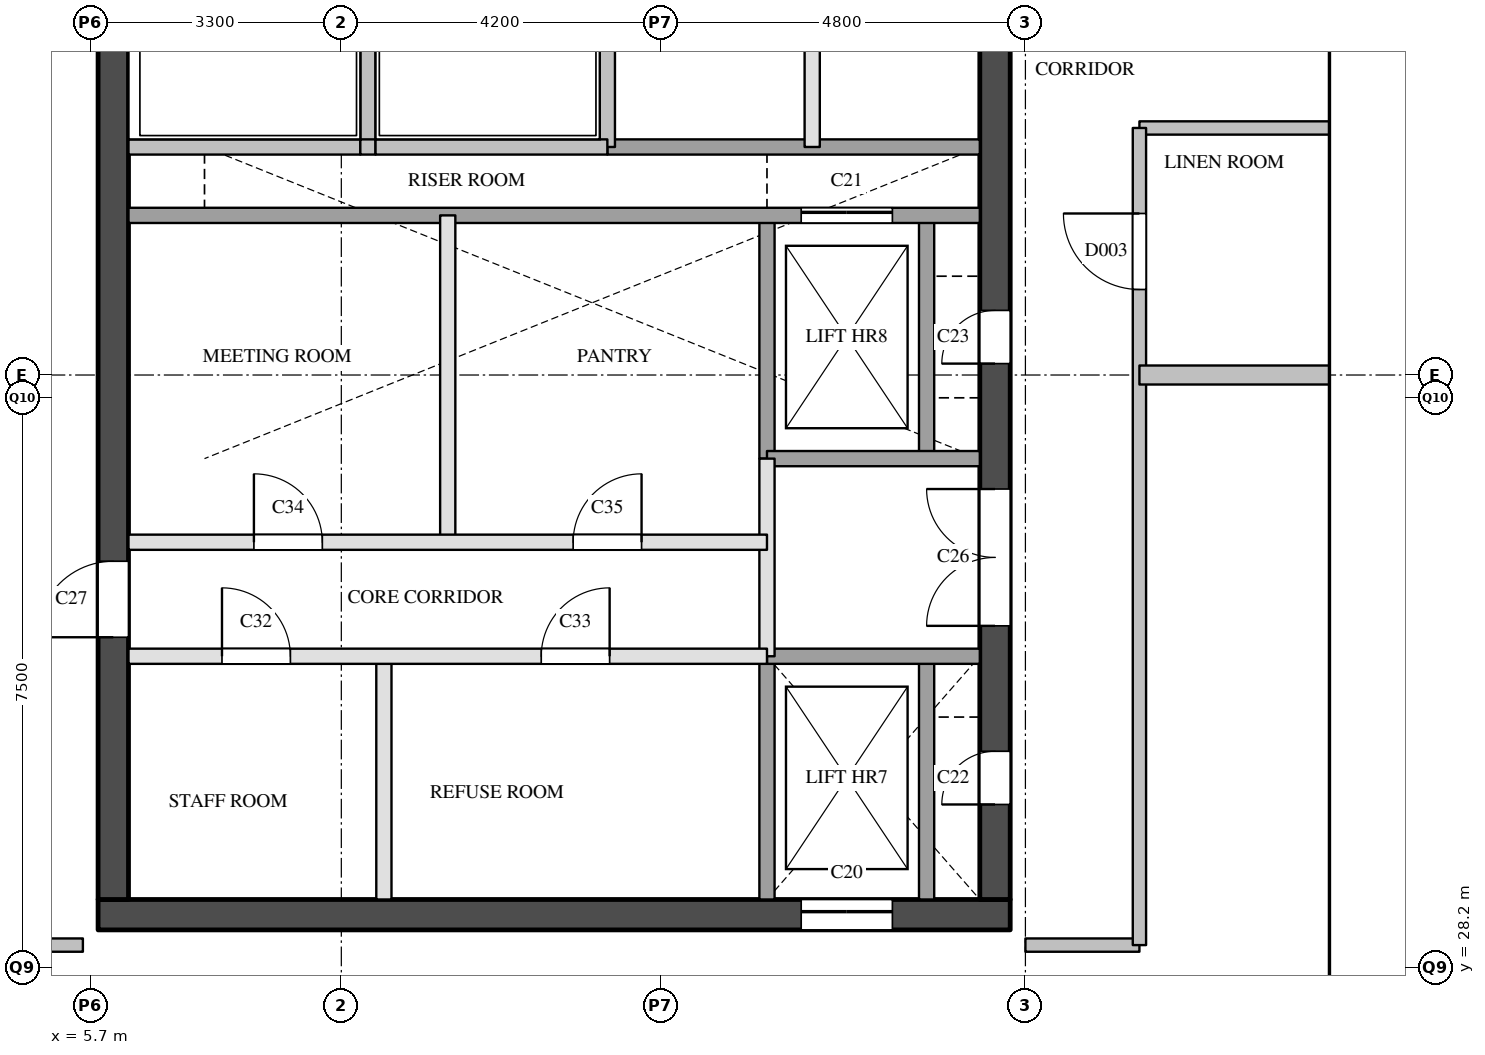
"""IFC4 building model, lengths in metres.
Left out: names, types, materials, properties, quantities, classifications, styles, units other than length and angle.
Written with IfcOpenShell. Run it as: python <this file> out.ifc"""

import sys

from ifc_helpers import new_model, si_unit, direction, frame, frame_2d, origin, place, context, subcontext, project, spatial, rectangle, extrude, element, fill, save


model = new_model("IFC4")
c1 = context("Model", 3, precision=1e-05, world=origin(), true_north=direction((0.0, 1.0)))
c2 = subcontext(c1, "Body", "Model", "MODEL_VIEW")
j1 = project(units=[si_unit("LENGTHUNIT", "METRE"), si_unit("PLANEANGLEUNIT", "RADIAN")], contexts=[c1])
p1 = place(None, origin())
s1 = spatial("IfcSite", under=j1, at=p1, CompositionType="ELEMENT")
p2 = place(p1, origin())
s2 = spatial("IfcBuilding", under=s1, at=p2, CompositionType="ELEMENT")
p3 = place(p2, frame((0.0, 0.0, 211.1)))
s3 = spatial("IfcBuildingStorey", under=s2, at=p3, CompositionType="ELEMENT", Elevation=211.1)
p4 = place(p3, frame((5.8, 28.9, 0.0), z_axis=(0.0, 0.0, 1.0), x_axis=(1.0, 0.0, 0.0)))
e1 = element("IfcWall", 1, at=p4, inside=s3, PredefinedType="SHEAR", context=c2, shape_type="SweptSolid", body=[
    extrude(rectangle(XDim=12.0, YDim=0.4, at=frame_2d((6.0, 0.0))), origin(), (0.0, 0.0, 1.0), 3.6),
])
p5 = place(p4, frame((9.25, 0.0, 0.0)))
e2 = element("IfcOpeningElement", 2, at=p5, cuts=e1, PredefinedType="OPENING", context=c2, shape_type="SweptSolid", body=[
    extrude(rectangle(XDim=1.2, YDim=2.1, at=frame_2d((0.6, 1.05))), frame((0.0, 0.21, 0.0), z_axis=(0.0, -1.0, 0.0), x_axis=(1.0, 0.0, 0.0)), (0.0, 0.0, 1.0), 0.42),
])
p6 = place(p3, frame((6.0, 29.1, 0.0), z_axis=(0.0, 0.0, 1.0), x_axis=(0.0, 1.0, 0.0)))
e3 = element("IfcWall", 3, at=p6, inside=s3, PredefinedType="SHEAR", context=c2, shape_type="SweptSolid", body=[
    extrude(rectangle(XDim=20.3, YDim=0.4, at=frame_2d((10.15, 0.0))), origin(), (0.0, 0.0, 1.0), 3.6),
])
p7 = place(p6, frame((3.45, 0.0, 0.0)))
e4 = element("IfcOpeningElement", 4, at=p7, cuts=e3, PredefinedType="OPENING", context=c2, shape_type="SweptSolid", body=[
    extrude(rectangle(XDim=1.0, YDim=2.1, at=frame_2d((0.5, 1.05))), frame((0.0, 0.21, 0.0), z_axis=(0.0, -1.0, 0.0), x_axis=(1.0, 0.0, 0.0)), (0.0, 0.0, 1.0), 0.42),
])
p8 = place(p6, frame((16.4, 0.0, 0.0)))
e5 = element("IfcOpeningElement", 5, at=p8, cuts=e3, PredefinedType="OPENING", context=c2, shape_type="SweptSolid", body=[
    extrude(rectangle(XDim=1.0, YDim=2.1, at=frame_2d((0.5, 1.05))), frame((0.0, 0.21, 0.0), z_axis=(0.0, -1.0, 0.0), x_axis=(1.0, 0.0, 0.0)), (0.0, 0.0, 1.0), 0.42),
])
p9 = place(p3, frame((17.6, 29.1, 0.0), z_axis=(0.0, 0.0, 1.0), x_axis=(0.0, 1.0, 0.0)))
e6 = element("IfcWall", 6, at=p9, inside=s3, PredefinedType="SHEAR", context=c2, shape_type="SweptSolid", body=[
    extrude(rectangle(XDim=20.3, YDim=0.4, at=frame_2d((10.15, 0.0))), origin(), (0.0, 0.0, 1.0), 3.6),
])
p10 = place(p9, frame((1.25, 0.0, 0.0)))
e7 = element("IfcOpeningElement", 7, at=p10, cuts=e6, PredefinedType="OPENING", context=c2, shape_type="SweptSolid", body=[
    extrude(rectangle(XDim=0.7, YDim=2.1, at=frame_2d((0.35, 1.05))), frame((0.0, 0.21, 0.0), z_axis=(0.0, -1.0, 0.0), x_axis=(1.0, 0.0, 0.0)), (0.0, 0.0, 1.0), 0.42),
])
p11 = place(p9, frame((7.05, 0.0, 0.0)))
e8 = element("IfcOpeningElement", 8, at=p11, cuts=e6, PredefinedType="OPENING", context=c2, shape_type="SweptSolid", body=[
    extrude(rectangle(XDim=0.7, YDim=2.1, at=frame_2d((0.35, 1.05))), frame((0.0, 0.21, 0.0), z_axis=(0.0, -1.0, 0.0), x_axis=(1.0, 0.0, 0.0)), (0.0, 0.0, 1.0), 0.42),
])
p12 = place(p9, frame((3.6, 0.0, 0.0)))
e9 = element("IfcOpeningElement", 9, at=p12, cuts=e6, PredefinedType="OPENING", context=c2, shape_type="SweptSolid", body=[
    extrude(rectangle(XDim=1.8, YDim=2.1, at=frame_2d((0.9, 1.05))), frame((0.0, 0.21, 0.0), z_axis=(0.0, -1.0, 0.0), x_axis=(1.0, 0.0, 0.0)), (0.0, 0.0, 1.0), 0.42),
])
p13 = place(p3, frame((9.35, 39.0, 0.0), z_axis=(0.0, 0.0, 1.0), x_axis=(0.0, 1.0, 0.0)))
e10 = element("IfcWall", 10, at=p13, inside=s3, PredefinedType="SOLIDWALL", context=c2, shape_type="SweptSolid", body=[
    extrude(rectangle(XDim=1.9, YDim=0.2, at=frame_2d((0.95, 0.0))), origin(), (0.0, 0.0, 1.0), 3.6),
])
p14 = place(p3, frame((9.56, 29.1, 0.0), z_axis=(0.0, 0.0, 1.0), x_axis=(0.0, 1.0, 0.0)))
e11 = element("IfcWall", 11, at=p14, inside=s3, PredefinedType="PARTITIONING", context=c2, shape_type="SweptSolid", body=[
    extrude(rectangle(XDim=3.2, YDim=0.2, at=frame_2d((1.6, 0.0))), origin(), (0.0, 0.0, 1.0), 3.6),
])
p15 = place(p3, frame((10.4, 33.8, 0.0), z_axis=(0.0, 0.0, 1.0), x_axis=(0.0, 1.0, 0.0)))
e12 = element("IfcWall", 12, at=p15, inside=s3, PredefinedType="PARTITIONING", context=c2, shape_type="SweptSolid", body=[
    extrude(rectangle(XDim=4.3, YDim=0.2, at=frame_2d((2.15, 0.0))), origin(), (0.0, 0.0, 1.0), 3.6),
])
p16 = place(p3, frame((12.5, 39.0, 0.0), z_axis=(0.0, 0.0, 1.0), x_axis=(0.0, 1.0, 0.0)))
e13 = element("IfcWall", 13, at=p16, inside=s3, PredefinedType="SOLIDWALL", context=c2, shape_type="SweptSolid", body=[
    extrude(rectangle(XDim=1.9, YDim=0.2, at=frame_2d((0.95, 0.0))), origin(), (0.0, 0.0, 1.0), 3.6),
])
p17 = place(p3, frame((14.6, 32.3, 0.0), z_axis=(0.0, 0.0, 1.0), x_axis=(0.0, 1.0, 0.0)))
e14 = element("IfcWall", 14, at=p17, inside=s3, PredefinedType="PARTITIONING", context=c2, shape_type="SweptSolid", body=[
    extrude(rectangle(XDim=2.6, YDim=0.2, at=frame_2d((1.3, 0.0))), origin(), (0.0, 0.0, 1.0), 3.6),
])
p18 = place(p3, frame((14.6, 29.1, 0.0), z_axis=(0.0, 0.0, 1.0), x_axis=(0.0, 1.0, 0.0)))
e15 = element("IfcWall", 15, at=p18, inside=s3, PredefinedType="SOLIDWALL", context=c2, shape_type="SweptSolid", body=[
    extrude(rectangle(XDim=3.2, YDim=0.2, at=frame_2d((1.6, 0.0))), origin(), (0.0, 0.0, 1.0), 3.6),
])
p19 = place(p3, frame((14.6, 34.9, 0.0), z_axis=(0.0, 0.0, 1.0), x_axis=(0.0, 1.0, 0.0)))
e16 = element("IfcWall", 16, at=p19, inside=s3, PredefinedType="SOLIDWALL", context=c2, shape_type="SweptSolid", body=[
    extrude(rectangle(XDim=3.2, YDim=0.2, at=frame_2d((1.6, 0.0))), origin(), (0.0, 0.0, 1.0), 3.6),
])
p20 = place(p3, frame((15.195, 39.0, 0.0), z_axis=(0.0, 0.0, 1.0), x_axis=(0.0, 1.0, 0.0)))
e17 = element("IfcWall", 17, at=p20, inside=s3, PredefinedType="PARTITIONING", context=c2, shape_type="SweptSolid", body=[
    extrude(rectangle(XDim=6.2, YDim=0.2, at=frame_2d((3.1, 0.0))), origin(), (0.0, 0.0, 1.0), 3.6),
])
p21 = place(p3, frame((16.7, 29.1, 0.0), z_axis=(0.0, 0.0, 1.0), x_axis=(0.0, 1.0, 0.0)))
e18 = element("IfcWall", 18, at=p21, inside=s3, PredefinedType="SOLIDWALL", context=c2, shape_type="SweptSolid", body=[
    extrude(rectangle(XDim=3.2, YDim=0.2, at=frame_2d((1.6, 0.0))), origin(), (0.0, 0.0, 1.0), 3.6),
])
p22 = place(p3, frame((16.7, 34.9, 0.0), z_axis=(0.0, 0.0, 1.0), x_axis=(0.0, 1.0, 0.0)))
e19 = element("IfcWall", 19, at=p22, inside=s3, PredefinedType="SOLIDWALL", context=c2, shape_type="SweptSolid", body=[
    extrude(rectangle(XDim=3.2, YDim=0.2, at=frame_2d((1.6, 0.0))), origin(), (0.0, 0.0, 1.0), 3.6),
])
p23 = place(p3, frame((6.2, 32.3, 0.0), z_axis=(0.0, 0.0, 1.0), x_axis=(1.0, 0.0, 0.0)))
e20 = element("IfcWall", 20, at=p23, inside=s3, PredefinedType="PARTITIONING", context=c2, shape_type="SweptSolid", body=[
    extrude(rectangle(XDim=8.4, YDim=0.2, at=frame_2d((4.2, 0.0))), origin(), (0.0, 0.0, 1.0), 3.6),
])
p24 = place(p23, frame((1.23, 0.0, 0.0)))
e21 = element("IfcOpeningElement", 21, at=p24, cuts=e20, PredefinedType="OPENING", context=c2, shape_type="SweptSolid", body=[
    extrude(rectangle(XDim=0.9, YDim=2.1, at=frame_2d((0.45, 1.05))), frame((0.0, 0.11, 0.0), z_axis=(0.0, -1.0, 0.0), x_axis=(1.0, 0.0, 0.0)), (0.0, 0.0, 1.0), 0.22),
])
p25 = place(p23, frame((5.43, 0.0, 0.0)))
e22 = element("IfcOpeningElement", 22, at=p25, cuts=e20, PredefinedType="OPENING", context=c2, shape_type="SweptSolid", body=[
    extrude(rectangle(XDim=0.9, YDim=2.1, at=frame_2d((0.45, 1.05))), frame((0.0, 0.11, 0.0), z_axis=(0.0, -1.0, 0.0), x_axis=(1.0, 0.0, 0.0)), (0.0, 0.0, 1.0), 0.22),
])
p26 = place(p3, frame((14.6, 32.3, 0.0), z_axis=(0.0, 0.0, 1.0), x_axis=(1.0, 0.0, 0.0)))
e23 = element("IfcWall", 23, at=p26, inside=s3, PredefinedType="SOLIDWALL", context=c2, shape_type="SweptSolid", body=[
    extrude(rectangle(XDim=2.8, YDim=0.2, at=frame_2d((1.4, 0.0))), origin(), (0.0, 0.0, 1.0), 3.6),
])
p27 = place(p3, frame((6.2, 33.8, 0.0), z_axis=(0.0, 0.0, 1.0), x_axis=(1.0, 0.0, 0.0)))
e24 = element("IfcWall", 24, at=p27, inside=s3, PredefinedType="PARTITIONING", context=c2, shape_type="SweptSolid", body=[
    extrude(rectangle(XDim=8.4, YDim=0.2, at=frame_2d((4.2, 0.0))), origin(), (0.0, 0.0, 1.0), 3.6),
])
p28 = place(p27, frame((1.65, 0.0, 0.0)))
e25 = element("IfcOpeningElement", 25, at=p28, cuts=e24, PredefinedType="OPENING", context=c2, shape_type="SweptSolid", body=[
    extrude(rectangle(XDim=0.9, YDim=2.1, at=frame_2d((0.45, 1.05))), frame((0.0, 0.11, 0.0), z_axis=(0.0, -1.0, 0.0), x_axis=(1.0, 0.0, 0.0)), (0.0, 0.0, 1.0), 0.22),
])
p29 = place(p27, frame((5.85, 0.0, 0.0)))
e26 = element("IfcOpeningElement", 26, at=p29, cuts=e24, PredefinedType="OPENING", context=c2, shape_type="SweptSolid", body=[
    extrude(rectangle(XDim=0.9, YDim=2.1, at=frame_2d((0.45, 1.05))), frame((0.0, 0.11, 0.0), z_axis=(0.0, -1.0, 0.0), x_axis=(1.0, 0.0, 0.0)), (0.0, 0.0, 1.0), 0.22),
])
p30 = place(p3, frame((14.6, 34.9, 0.0), z_axis=(0.0, 0.0, 1.0), x_axis=(1.0, 0.0, 0.0)))
e27 = element("IfcWall", 27, at=p30, inside=s3, PredefinedType="SOLIDWALL", context=c2, shape_type="SweptSolid", body=[
    extrude(rectangle(XDim=2.8, YDim=0.2, at=frame_2d((1.4, 0.0))), origin(), (0.0, 0.0, 1.0), 3.6),
])
p31 = place(p3, frame((6.2, 38.1, 0.0), z_axis=(0.0, 0.0, 1.0), x_axis=(1.0, 0.0, 0.0)))
e28 = element("IfcWall", 28, at=p31, inside=s3, PredefinedType="SOLIDWALL", context=c2, shape_type="SweptSolid", body=[
    extrude(rectangle(XDim=11.2, YDim=0.2, at=frame_2d((5.6, 0.0))), origin(), (0.0, 0.0, 1.0), 3.6),
])
p32 = place(p31, frame((8.85, 0.0, 0.0)))
e29 = element("IfcOpeningElement", 29, at=p32, cuts=e28, PredefinedType="OPENING", context=c2, shape_type="SweptSolid", body=[
    extrude(rectangle(XDim=1.2, YDim=2.1, at=frame_2d((0.6, 1.05))), frame((0.0, 0.11, 0.0), z_axis=(0.0, -1.0, 0.0), x_axis=(1.0, 0.0, 0.0)), (0.0, 0.0, 1.0), 0.22),
])
p33 = place(p3, frame((12.5, 39.0, 0.0), z_axis=(0.0, 0.0, 1.0), x_axis=(1.0, 0.0, 0.0)))
e30 = element("IfcWall", 30, at=p33, inside=s3, PredefinedType="SOLIDWALL", context=c2, shape_type="SweptSolid", body=[
    extrude(rectangle(XDim=4.9, YDim=0.2, at=frame_2d((2.45, 0.0))), origin(), (0.0, 0.0, 1.0), 3.6),
])
p34 = place(p3, frame((6.2, 39.0, 0.0), z_axis=(0.0, 0.0, 1.0), x_axis=(1.0, 0.0, 0.0)))
e31 = element("IfcWall", 31, at=p34, inside=s3, PredefinedType="SOLIDWALL", context=c2, shape_type="SweptSolid", body=[
    extrude(rectangle(XDim=3.05, YDim=0.2, at=frame_2d((1.525, 0.0))), origin(), (0.0, 0.0, 1.0), 3.6),
])
p35 = place(p3, frame((9.25, 39.0, 0.0), z_axis=(0.0, 0.0, 1.0), x_axis=(1.0, 0.0, 0.0)))
e32 = element("IfcWall", 32, at=p35, inside=s3, PredefinedType="SOLIDWALL", context=c2, shape_type="SweptSolid", body=[
    extrude(rectangle(XDim=0.2, YDim=0.2, at=frame_2d((0.1, 0.0))), origin(), (0.0, 0.0, 1.0), 3.6),
])
p36 = place(p3, frame((9.45, 39.0, 0.0), z_axis=(0.0, 0.0, 1.0), x_axis=(1.0, 0.0, 0.0)))
e33 = element("IfcWall", 33, at=p36, inside=s3, PredefinedType="SOLIDWALL", context=c2, shape_type="SweptSolid", body=[
    extrude(rectangle(XDim=3.05, YDim=0.2, at=frame_2d((1.525, 0.0))), origin(), (0.0, 0.0, 1.0), 3.6),
])
for number, where, z_axis, x_axis in (
    (34, (4.1, 28.5, 0.0), (0.0, 0.0, 1.0), (1.0, 0.0, 0.0)),
    (35, (18.0, 28.5, 0.0), (0.0, 0.0, 1.0), (1.0, 0.0, 0.0)),
):
    element("IfcWall", number, at=place(p3, frame(where, z_axis=z_axis, x_axis=x_axis)), inside=s3, PredefinedType="PARTITIONING", context=c2, shape_type="SweptSolid", body=[
        extrude(rectangle(XDim=1.5, YDim=0.175, at=frame_2d((0.75, 0.0))), origin(), (0.0, 0.0, 1.0), 3.6),
    ])
p37 = place(p3, frame((19.5, 39.25, 0.0), z_axis=(0.0, 0.0, 1.0), x_axis=(1.0, 0.0, 0.0)))
e36 = element("IfcWall", 36, at=p37, inside=s3, PredefinedType="PARTITIONING", context=c2, shape_type="SweptSolid", body=[
    extrude(rectangle(XDim=2.5, YDim=0.175, at=frame_2d((1.25, 0.0))), origin(), (0.0, 0.0, 1.0), 3.6),
])
p38 = place(p3, frame((19.5, 28.5, 0.0), z_axis=(0.0, 0.0, 1.0), x_axis=(0.0, 1.0, 0.0)))
e37 = element("IfcWall", 37, at=p38, inside=s3, PredefinedType="PARTITIONING", context=c2, shape_type="SweptSolid", body=[
    extrude(rectangle(XDim=10.75, YDim=0.175, at=frame_2d((5.375, 0.0))), origin(), (0.0, 0.0, 1.0), 3.6),
])
p39 = place(p38, frame((8.625, 0.0, 0.0)))
e38 = element("IfcOpeningElement", 38, at=p39, cuts=e37, PredefinedType="OPENING", context=c2, shape_type="SweptSolid", body=[
    extrude(rectangle(XDim=1.0, YDim=2.1, at=frame_2d((0.5, 1.05))), frame((0.0, 0.097, 0.0), z_axis=(0.0, -1.0, 0.0), x_axis=(1.0, 0.0, 0.0)), (0.0, 0.0, 1.0), 0.195),
])
p40 = place(p3, frame((19.5, 36.0, 0.0), z_axis=(0.0, 0.0, 1.0), x_axis=(1.0, 0.0, 0.0)))
e39 = element("IfcWall", 39, at=p40, inside=s3, PredefinedType="PARTITIONING", context=c2, shape_type="SweptSolid", body=[
    extrude(rectangle(XDim=2.5, YDim=0.25, at=frame_2d((1.25, 0.0))), origin(), (0.0, 0.0, 1.0), 3.6),
])
p41 = place(p5, origin())
e40 = element("IfcDoor", 40, at=p41, inside=s3, OperationType="SLIDING_TO_LEFT", PredefinedType="DOOR", context=c2, shape_type="SweptSolid", body=[
    extrude(rectangle(XDim=1.2, YDim=2.1, at=frame_2d((0.6, 1.05))), frame((0.0, 0.025, 0.0), z_axis=(0.0, -1.0, 0.0), x_axis=(1.0, 0.0, 0.0)), (0.0, 0.0, 1.0), 0.05),
])
fill(e2, e40)
p42 = place(p32, origin())
e41 = element("IfcDoor", 41, at=p42, inside=s3, OperationType="SLIDING_TO_LEFT", PredefinedType="DOOR", context=c2, shape_type="SweptSolid", body=[
    extrude(rectangle(XDim=1.2, YDim=2.1, at=frame_2d((0.6, 1.05))), frame((0.0, 0.025, 0.0), z_axis=(0.0, -1.0, 0.0), x_axis=(1.0, 0.0, 0.0)), (0.0, 0.0, 1.0), 0.05),
])
fill(e29, e41)
p43 = place(p10, origin())
e42 = element("IfcDoor", 42, at=p43, inside=s3, OperationType="SINGLE_SWING_LEFT", PredefinedType="DOOR", context=c2, shape_type="SweptSolid", body=[
    extrude(rectangle(XDim=0.7, YDim=2.1, at=frame_2d((0.35, 1.05))), frame((0.0, 0.025, 0.0), z_axis=(0.0, -1.0, 0.0), x_axis=(1.0, 0.0, 0.0)), (0.0, 0.0, 1.0), 0.05),
])
fill(e7, e42)
p44 = place(p11, origin())
e43 = element("IfcDoor", 43, at=p44, inside=s3, OperationType="SINGLE_SWING_LEFT", PredefinedType="DOOR", context=c2, shape_type="SweptSolid", body=[
    extrude(rectangle(XDim=0.7, YDim=2.1, at=frame_2d((0.35, 1.05))), frame((0.0, 0.025, 0.0), z_axis=(0.0, -1.0, 0.0), x_axis=(1.0, 0.0, 0.0)), (0.0, 0.0, 1.0), 0.05),
])
fill(e8, e43)
p45 = place(p12, origin())
e44 = element("IfcDoor", 44, at=p45, inside=s3, OperationType="DOUBLE_DOOR_SINGLE_SWING", PredefinedType="DOOR", context=c2, shape_type="SweptSolid", body=[
    extrude(rectangle(XDim=1.8, YDim=2.1, at=frame_2d((0.9, 1.05))), frame((0.0, 0.025, 0.0), z_axis=(0.0, -1.0, 0.0), x_axis=(1.0, 0.0, 0.0)), (0.0, 0.0, 1.0), 0.05),
])
fill(e9, e44)
p46 = place(p7, origin())
e45 = element("IfcDoor", 45, at=p46, inside=s3, OperationType="SINGLE_SWING_LEFT", PredefinedType="DOOR", context=c2, shape_type="SweptSolid", body=[
    extrude(rectangle(XDim=1.0, YDim=2.1, at=frame_2d((0.5, 1.05))), frame((0.0, 0.025, 0.0), z_axis=(0.0, -1.0, 0.0), x_axis=(1.0, 0.0, 0.0)), (0.0, 0.0, 1.0), 0.05),
])
fill(e4, e45)
p47 = place(p24, origin())
e46 = element("IfcDoor", 46, at=p47, inside=s3, OperationType="SINGLE_SWING_LEFT", PredefinedType="DOOR", context=c2, shape_type="SweptSolid", body=[
    extrude(rectangle(XDim=0.9, YDim=2.1, at=frame_2d((0.45, 1.05))), frame((0.0, 0.025, 0.0), z_axis=(0.0, -1.0, 0.0), x_axis=(1.0, 0.0, 0.0)), (0.0, 0.0, 1.0), 0.05),
])
fill(e21, e46)
p48 = place(p25, origin())
e47 = element("IfcDoor", 47, at=p48, inside=s3, OperationType="SINGLE_SWING_RIGHT", PredefinedType="DOOR", context=c2, shape_type="SweptSolid", body=[
    extrude(rectangle(XDim=0.9, YDim=2.1, at=frame_2d((0.45, 1.05))), frame((0.0, 0.025, 0.0), z_axis=(0.0, -1.0, 0.0), x_axis=(1.0, 0.0, 0.0)), (0.0, 0.0, 1.0), 0.05),
])
fill(e22, e47)
p49 = place(p28, origin())
e48 = element("IfcDoor", 48, at=p49, inside=s3, OperationType="SINGLE_SWING_LEFT", PredefinedType="DOOR", context=c2, shape_type="SweptSolid", body=[
    extrude(rectangle(XDim=0.9, YDim=2.1, at=frame_2d((0.45, 1.05))), frame((0.0, 0.025, 0.0), z_axis=(0.0, -1.0, 0.0), x_axis=(1.0, 0.0, 0.0)), (0.0, 0.0, 1.0), 0.05),
])
fill(e25, e48)
p50 = place(p29, origin())
e49 = element("IfcDoor", 49, at=p50, inside=s3, OperationType="SINGLE_SWING_RIGHT", PredefinedType="DOOR", context=c2, shape_type="SweptSolid", body=[
    extrude(rectangle(XDim=0.9, YDim=2.1, at=frame_2d((0.45, 1.05))), frame((0.0, 0.025, 0.0), z_axis=(0.0, -1.0, 0.0), x_axis=(1.0, 0.0, 0.0)), (0.0, 0.0, 1.0), 0.05),
])
fill(e26, e49)
p51 = place(p39, origin())
e50 = element("IfcDoor", 50, at=p51, inside=s3, OperationType="SINGLE_SWING_RIGHT", PredefinedType="DOOR", context=c2, shape_type="SweptSolid", body=[
    extrude(rectangle(XDim=1.0, YDim=2.1, at=frame_2d((0.5, 1.05))), frame((0.0, 0.025, 0.0), z_axis=(0.0, -1.0, 0.0), x_axis=(1.0, 0.0, 0.0)), (0.0, 0.0, 1.0), 0.05),
])
fill(e38, e50)
save(model, sys.argv[1])
